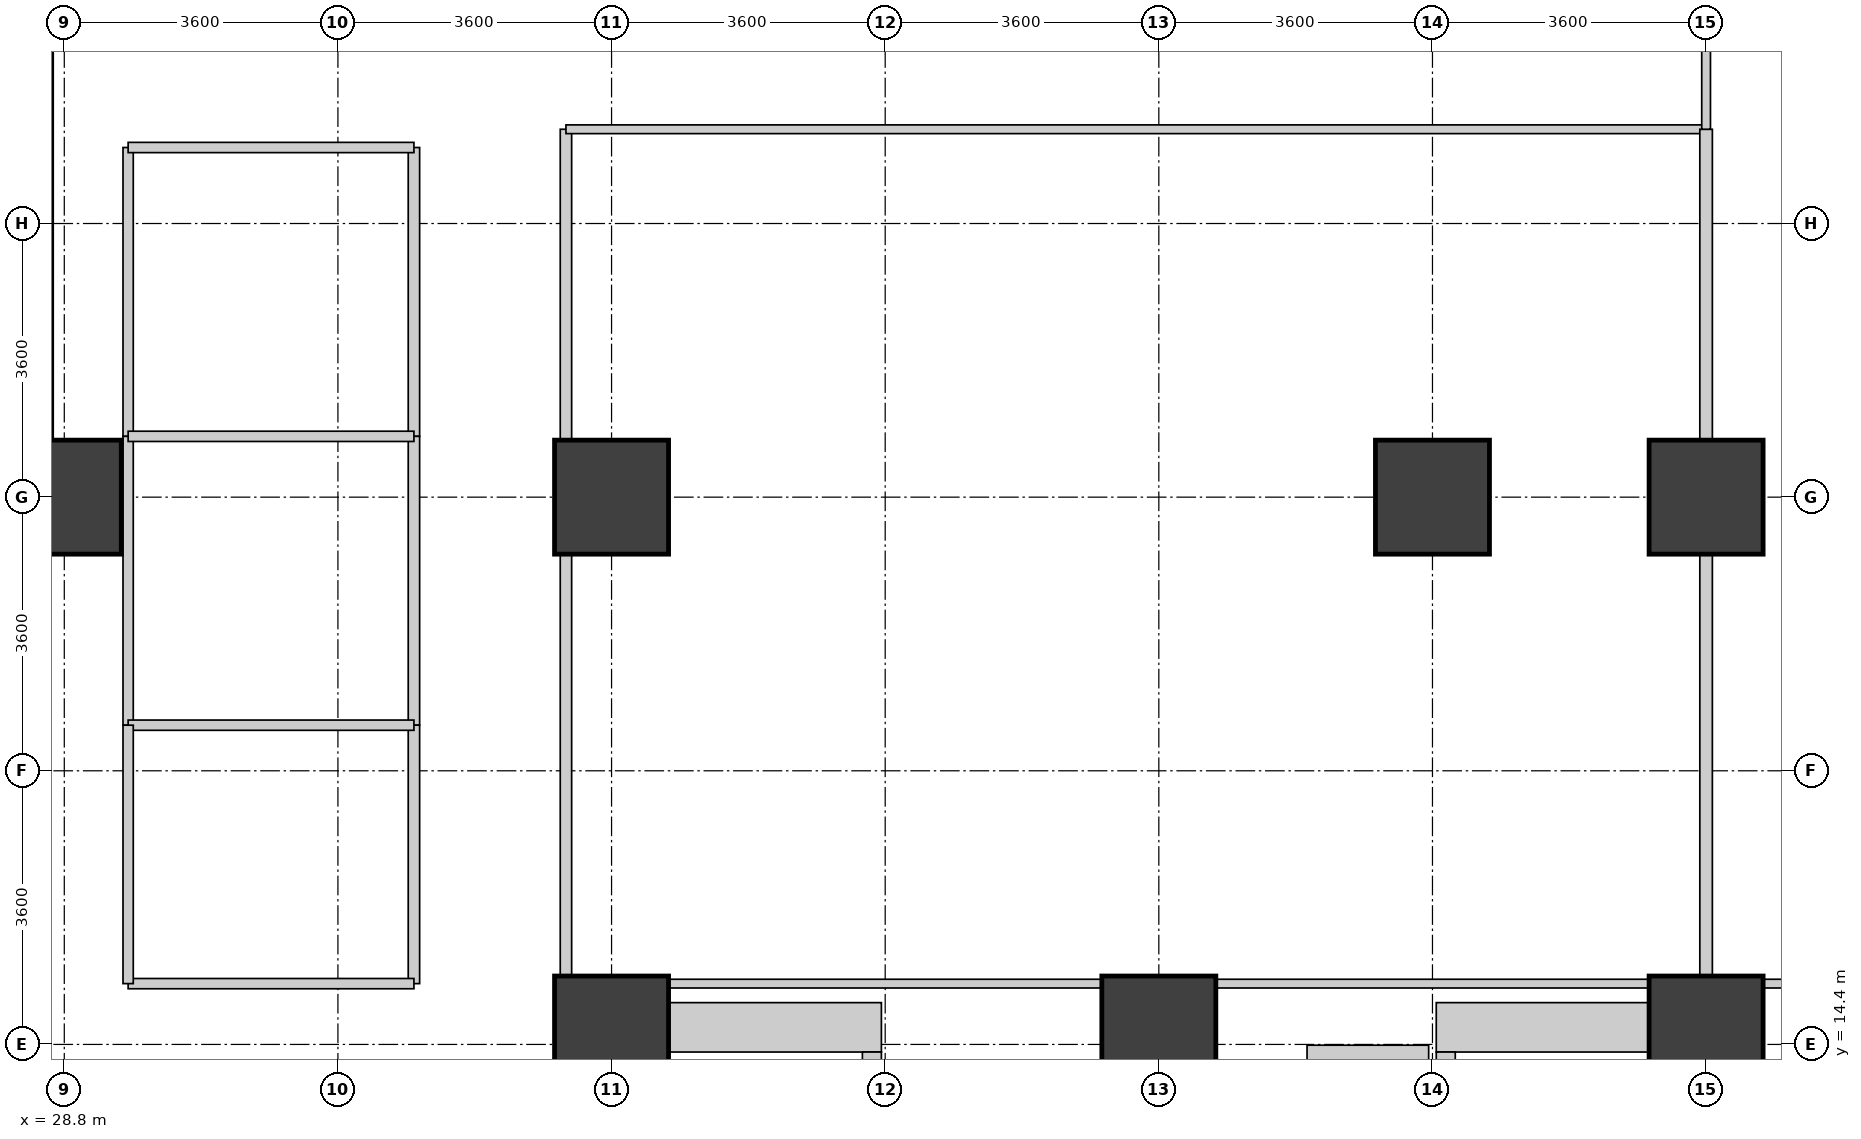
"""IFC4 building model, lengths in metres.
Left out: names, types, materials, properties, quantities, classifications, styles, units other than length and angle.
Written with IfcOpenShell. Run it as: python <this file> out.ifc"""

import sys

from ifc_helpers import new_model, si_unit, direction, frame, frame_2d, origin, origin_2d, place, context, subcontext, project, spatial, rectangle, extrude, source, transform, mapped, element, fill, save


model = new_model("IFC4")
c1 = context("Model", 3, precision=1e-05, world=origin(), true_north=direction((0.0, 1.0)))
c2 = subcontext(c1, "Body", "Model", "MODEL_VIEW")
j1 = project(units=[si_unit("LENGTHUNIT", "METRE"), si_unit("PLANEANGLEUNIT", "RADIAN")], contexts=[c1])
p1 = place(None, origin())
s1 = spatial("IfcSite", under=j1, at=p1, CompositionType="ELEMENT")
p2 = place(p1, origin())
s2 = spatial("IfcBuilding", under=s1, at=p2, CompositionType="ELEMENT")
p3 = place(p2, origin())
s3 = spatial("IfcBuildingStorey", under=s2, at=p3, CompositionType="ELEMENT", Elevation=0.0)
for number, where, z_axis, x_axis in (
    (1, (36.025, 6.65, 0.0), (0.0, 0.0, 1.0), (0.0, 1.0, 0.0)),
    (2, (50.375, 6.65, 0.0), (0.0, 0.0, 1.0), (0.0, 1.0, 0.0)),
):
    element("IfcWall", number, at=place(p3, frame(where, z_axis=z_axis, x_axis=x_axis)), inside=s3, PredefinedType="SHEAR", context=c2, shape_type="SweptSolid", body=[
        extrude(rectangle(XDim=8.3, YDim=0.65, at=frame_2d((4.15, 0.0))), origin(), (0.0, 0.0, 1.0), 5.12),
    ])
for number, where, z_axis, x_axis in (
    (3, (36.35, 14.625, 0.0), (0.0, 0.0, 1.0), (1.0, 0.0, 0.0)),
    (4, (46.85, 14.625, 0.0), (0.0, 0.0, 1.0), (1.0, 0.0, 0.0)),
):
    element("IfcWall", number, at=place(p3, frame(where, z_axis=z_axis, x_axis=x_axis)), inside=s3, PredefinedType="SHEAR", context=c2, shape_type="SweptSolid", body=[
        extrude(rectangle(XDim=3.2, YDim=0.65, at=frame_2d((1.6, 0.0))), origin(), (0.0, 0.0, 1.0), 5.12),
    ])
p4 = place(p3, frame((39.425, 7.3, 0.0), z_axis=(0.0, 0.0, 1.0), x_axis=(0.0, 1.0, 0.0)))
e5 = element("IfcWall", 5, at=p4, inside=s3, PredefinedType="SHEAR", context=c2, shape_type="SweptSolid", body=[
    extrude(rectangle(XDim=7.0, YDim=0.25, at=frame_2d((3.5, 0.0))), origin(), (0.0, 0.0, 1.0), 5.12),
])
p5 = place(p4, frame((0.15, 0.0, 0.0)))
e6 = element("IfcOpeningElement", 6, at=p5, cuts=e5, PredefinedType="OPENING", context=c2, shape_type="SweptSolid", body=[
    extrude(rectangle(XDim=1.1, YDim=2.08, at=frame_2d((0.55, 1.04))), frame((0.0, 0.135, 0.0), z_axis=(0.0, -1.0, 0.0), x_axis=(1.0, 0.0, 0.0)), (0.0, 0.0, 1.0), 0.27),
])
p6 = place(p3, frame((46.975, 7.3, 0.0), z_axis=(0.0, 0.0, 1.0), x_axis=(0.0, 1.0, 0.0)))
e7 = element("IfcWall", 7, at=p6, inside=s3, PredefinedType="SHEAR", context=c2, shape_type="SweptSolid", body=[
    extrude(rectangle(XDim=7.0, YDim=0.25, at=frame_2d((3.5, 0.0))), origin(), (0.0, 0.0, 1.0), 5.12),
])
p7 = place(p6, frame((0.15, 0.0, 0.0)))
e8 = element("IfcOpeningElement", 8, at=p7, cuts=e7, PredefinedType="OPENING", context=c2, shape_type="SweptSolid", body=[
    extrude(rectangle(XDim=1.1, YDim=2.08, at=frame_2d((0.55, 1.04))), frame((0.0, 0.135, 0.0), z_axis=(0.0, -1.0, 0.0), x_axis=(1.0, 0.0, 0.0)), (0.0, 0.0, 1.0), 0.27),
])
m1 = source(origin(), c2, "Body", "SweptSolid", [
    extrude(rectangle(XDim=1.5, YDim=1.5, at=origin_2d()), origin(), (0.0, 0.0, 1.0), 5.4),
])
for number, where, z_axis, x_axis in (
    (9, (28.8, 21.6, 0.0), (0.0, 0.0, 1.0), (1.0, 0.0, 0.0)),
    (10, (36.0, 21.6, 0.0), (0.0, 0.0, 1.0), (1.0, 0.0, 0.0)),
    (11, (46.8, 21.6, 0.0), (0.0, 0.0, 1.0), (1.0, 0.0, 0.0)),
    (12, (36.0, 14.55, 0.0), (0.0, 0.0, 1.0), (1.0, 0.0, 0.0)),
    (13, (43.2, 14.55, 0.0), (0.0, 0.0, 1.0), (1.0, 0.0, 0.0)),
    (14, (50.4, 14.55, 0.0), (0.0, 0.0, 1.0), (1.0, 0.0, 0.0)),
    (15, (50.4, 21.6, 0.0), (0.0, 0.0, 1.0), (1.0, 0.0, 0.0)),
):
    element("IfcColumn", number, at=place(p3, frame(where, z_axis=z_axis, x_axis=x_axis)), inside=s3, PredefinedType="COLUMN", context=c2, shape_type="MappedRepresentation", body=[
        mapped(m1, transform((0.0, 0.0, 0.0), x_axis=(1.0, 0.0, 0.0), y_axis=(0.0, 1.0, 0.0), z_axis=(0.0, 0.0, 1.0), scale=1.0)),
    ])
p8 = place(p3, frame((45.15, 14.29, 0.0), z_axis=(0.0, 0.0, 1.0), x_axis=(1.0, 0.0, 0.0)))
e16 = element("IfcWall", 16, at=p8, inside=s3, PredefinedType="PARTITIONING", context=c2, shape_type="SweptSolid", body=[
    extrude(rectangle(XDim=1.6, YDim=0.2, at=frame_2d((0.8, 0.0))), origin(), (0.0, 0.0, 1.0), 3.9),
])
p9 = place(p3, frame((35.4, 15.3, 0.0), z_axis=(0.0, 0.0, 1.0), x_axis=(0.0, 1.0, 0.0)))
e17 = element("IfcWall", 17, at=p9, inside=s3, PredefinedType="PARTITIONING", context=c2, shape_type="SweptSolid", body=[
    extrude(rectangle(XDim=5.55, YDim=0.15, at=frame_2d((2.775, 0.0))), origin(), (0.0, 0.0, 1.0), 5.1),
])
p10 = place(p9, frame((2.125, 0.0, 0.0)))
e18 = element("IfcOpeningElement", 18, at=p10, cuts=e17, PredefinedType="OPENING", context=c2, shape_type="SweptSolid", body=[
    extrude(rectangle(XDim=1.3, YDim=2.12, at=frame_2d((0.65, 1.06))), frame((0.0, 0.085, 0.0), z_axis=(0.0, -1.0, 0.0), x_axis=(1.0, 0.0, 0.0)), (0.0, 0.0, 1.0), 0.17),
])
p11 = place(p3, frame((35.4, 22.35, 0.0), z_axis=(0.0, 0.0, 1.0), x_axis=(0.0, 1.0, 0.0)))
e19 = element("IfcWall", 19, at=p11, inside=s3, PredefinedType="PARTITIONING", context=c2, shape_type="SweptSolid", body=[
    extrude(rectangle(XDim=4.09, YDim=0.15, at=frame_2d((2.045, 0.0))), origin(), (0.0, 0.0, 1.0), 5.1),
])
p12 = place(p3, frame((33.4, 22.4, 0.0), z_axis=(0.0, 0.0, 1.0), x_axis=(0.0, 1.0, 0.0)))
e20 = element("IfcWall", 20, at=p12, inside=s3, PredefinedType="PARTITIONING", context=c2, shape_type="SweptSolid", body=[
    extrude(rectangle(XDim=3.8, YDim=0.15, at=frame_2d((1.9, 0.0))), origin(), (0.0, 0.0, 1.0), 5.1),
])
p13 = place(p12, frame((1.475, 0.0, 0.0)))
e21 = element("IfcOpeningElement", 21, at=p13, cuts=e20, PredefinedType="OPENING", context=c2, shape_type="SweptSolid", body=[
    extrude(rectangle(XDim=0.85, YDim=2.04, at=frame_2d((0.425, 1.02))), frame((0.0, 0.085, 0.0), z_axis=(0.0, -1.0, 0.0), x_axis=(1.0, 0.0, 0.0)), (0.0, 0.0, 1.0), 0.17),
])
p14 = place(p3, frame((33.4, 18.6, 0.0), z_axis=(0.0, 0.0, 1.0), x_axis=(0.0, 1.0, 0.0)))
e22 = element("IfcWall", 22, at=p14, inside=s3, PredefinedType="PARTITIONING", context=c2, shape_type="SweptSolid", body=[
    extrude(rectangle(XDim=3.8, YDim=0.15, at=frame_2d((1.9, 0.0))), origin(), (0.0, 0.0, 1.0), 5.1),
])
p15 = place(p14, frame((1.475, 0.0, 0.0)))
e23 = element("IfcOpeningElement", 23, at=p15, cuts=e22, PredefinedType="OPENING", context=c2, shape_type="SweptSolid", body=[
    extrude(rectangle(XDim=0.85, YDim=2.04, at=frame_2d((0.425, 1.02))), frame((0.0, 0.085, 0.0), z_axis=(0.0, -1.0, 0.0), x_axis=(1.0, 0.0, 0.0)), (0.0, 0.0, 1.0), 0.17),
])
p16 = place(p3, frame((33.4, 15.2, 0.0), z_axis=(0.0, 0.0, 1.0), x_axis=(0.0, 1.0, 0.0)))
e24 = element("IfcWall", 24, at=p16, inside=s3, PredefinedType="PARTITIONING", context=c2, shape_type="SweptSolid", body=[
    extrude(rectangle(XDim=3.4, YDim=0.15, at=frame_2d((1.7, 0.0))), origin(), (0.0, 0.0, 1.0), 5.1),
])
p17 = place(p16, frame((1.175, 0.0, 0.0)))
e25 = element("IfcOpeningElement", 25, at=p17, cuts=e24, PredefinedType="OPENING", context=c2, shape_type="SweptSolid", body=[
    extrude(rectangle(XDim=1.05, YDim=2.12, at=frame_2d((0.525, 1.06))), frame((0.0, 0.085, 0.0), z_axis=(0.0, -1.0, 0.0), x_axis=(1.0, 0.0, 0.0)), (0.0, 0.0, 1.0), 0.17),
])
p18 = place(p3, frame((51.15, 15.2, 0.0), z_axis=(0.0, 0.0, 1.0), x_axis=(1.0, 0.0, 0.0)))
e26 = element("IfcWall", 26, at=p18, inside=s3, PredefinedType="PARTITIONING", context=c2, shape_type="SweptSolid", body=[
    extrude(rectangle(XDim=2.5, YDim=0.115, at=frame_2d((1.25, 0.0))), origin(), (0.0, 0.0, 1.0), 5.1),
])
for number, where, z_axis, x_axis in (
    (27, (36.75, 15.2, 0.0), (0.0, 0.0, 1.0), (1.0, 0.0, 0.0)),
    (28, (43.95, 15.2, 0.0), (0.0, 0.0, 1.0), (1.0, 0.0, 0.0)),
):
    element("IfcWall", number, at=place(p3, frame(where, z_axis=z_axis, x_axis=x_axis)), inside=s3, PredefinedType="PARTITIONING", context=c2, shape_type="SweptSolid", body=[
        extrude(rectangle(XDim=5.7, YDim=0.115, at=frame_2d((2.85, 0.0))), origin(), (0.0, 0.0, 1.0), 5.1),
    ])
p19 = place(p3, frame((35.4, 26.44, 0.0), z_axis=(0.0, 0.0, 1.0), x_axis=(1.0, 0.0, 0.0)))
e29 = element("IfcWall", 29, at=p19, inside=s3, PredefinedType="PARTITIONING", context=c2, shape_type="SweptSolid", body=[
    extrude(rectangle(XDim=15.0, YDim=0.115, at=frame_2d((7.5, 0.0))), origin(), (0.0, 0.0, 1.0), 5.1),
])
p20 = place(p3, frame((50.4, 15.2, 0.0), z_axis=(0.0, 0.0, 1.0), x_axis=(0.0, 1.0, 0.0)))
e30 = element("IfcWall", 30, at=p20, inside=s3, PredefinedType="PARTITIONING", context=c2, shape_type="SweptSolid", body=[
    extrude(rectangle(XDim=11.24, YDim=0.165, at=frame_2d((5.62, 0.0))), origin(), (0.0, 0.0, 1.0), 4.5),
])
p21 = place(p3, frame((50.4, 26.44, 0.0), z_axis=(0.0, 0.0, 1.0), x_axis=(0.0, 1.0, 0.0)))
e31 = element("IfcWall", 31, at=p21, inside=s3, PredefinedType="PARTITIONING", context=c2, shape_type="SweptSolid", body=[
    extrude(rectangle(XDim=1.46, YDim=0.115, at=frame_2d((0.73, 0.0))), origin(), (0.0, 0.0, 1.0), 5.1),
])
p22 = place(p3, frame((29.64, 22.4, 0.0), z_axis=(0.0, 0.0, 1.0), x_axis=(0.0, 1.0, 0.0)))
e32 = element("IfcWall", 32, at=p22, inside=s3, PredefinedType="PARTITIONING", context=c2, shape_type="SweptSolid", body=[
    extrude(rectangle(XDim=3.8, YDim=0.135, at=frame_2d((1.9, 0.0))), origin(), (0.0, 0.0, 1.0), 5.1),
])
p23 = place(p3, frame((29.64, 18.6, 0.0), z_axis=(0.0, 0.0, 1.0), x_axis=(0.0, 1.0, 0.0)))
e33 = element("IfcWall", 33, at=p23, inside=s3, PredefinedType="PARTITIONING", context=c2, shape_type="SweptSolid", body=[
    extrude(rectangle(XDim=3.8, YDim=0.135, at=frame_2d((1.9, 0.0))), origin(), (0.0, 0.0, 1.0), 5.1),
])
for number, where, z_axis, x_axis in (
    (34, (29.64, 15.2, 0.0), (0.0, 0.0, 1.0), (1.0, 0.0, 0.0)),
    (35, (29.64, 18.6, 0.0), (0.0, 0.0, 1.0), (1.0, 0.0, 0.0)),
    (36, (29.64, 22.4, 0.0), (0.0, 0.0, 1.0), (1.0, 0.0, 0.0)),
    (37, (29.64, 26.2, 0.0), (0.0, 0.0, 1.0), (1.0, 0.0, 0.0)),
):
    element("IfcWall", number, at=place(p3, frame(where, z_axis=z_axis, x_axis=x_axis)), inside=s3, PredefinedType="PARTITIONING", context=c2, shape_type="SweptSolid", body=[
        extrude(rectangle(XDim=3.76, YDim=0.135, at=frame_2d((1.88, 0.0))), origin(), (0.0, 0.0, 1.0), 5.1),
    ])
p24 = place(p3, frame((29.64, 15.2, 0.0), z_axis=(0.0, 0.0, 1.0), x_axis=(0.0, 1.0, 0.0)))
e38 = element("IfcWall", 38, at=p24, inside=s3, PredefinedType="PARTITIONING", context=c2, shape_type="SweptSolid", body=[
    extrude(rectangle(XDim=3.4, YDim=0.135, at=frame_2d((1.7, 0.0))), origin(), (0.0, 0.0, 1.0), 5.1),
])
p25 = place(p10, origin())
e39 = element("IfcDoor", 39, at=p25, inside=s3, OperationType="DOUBLE_DOOR_SINGLE_SWING", PredefinedType="DOOR", context=c2, shape_type="SweptSolid", body=[
    extrude(rectangle(XDim=1.3, YDim=2.12, at=frame_2d((0.65, 1.06))), frame((0.0, 0.025, 0.0), z_axis=(0.0, -1.0, 0.0), x_axis=(1.0, 0.0, 0.0)), (0.0, 0.0, 1.0), 0.05),
])
fill(e18, e39)
p26 = place(p13, origin())
e40 = element("IfcDoor", 40, at=p26, inside=s3, OperationType="SINGLE_SWING_LEFT", PredefinedType="DOOR", context=c2, shape_type="SweptSolid", body=[
    extrude(rectangle(XDim=0.85, YDim=2.04, at=frame_2d((0.425, 1.02))), frame((0.0, 0.025, 0.0), z_axis=(0.0, -1.0, 0.0), x_axis=(1.0, 0.0, 0.0)), (0.0, 0.0, 1.0), 0.05),
])
fill(e21, e40)
p27 = place(p15, origin())
e41 = element("IfcDoor", 41, at=p27, inside=s3, OperationType="SINGLE_SWING_RIGHT", PredefinedType="DOOR", context=c2, shape_type="SweptSolid", body=[
    extrude(rectangle(XDim=0.85, YDim=2.04, at=frame_2d((0.425, 1.02))), frame((0.0, 0.025, 0.0), z_axis=(0.0, -1.0, 0.0), x_axis=(1.0, 0.0, 0.0)), (0.0, 0.0, 1.0), 0.05),
])
fill(e23, e41)
p28 = place(p17, origin())
e42 = element("IfcDoor", 42, at=p28, inside=s3, OperationType="SINGLE_SWING_LEFT", PredefinedType="DOOR", context=c2, shape_type="SweptSolid", body=[
    extrude(rectangle(XDim=1.05, YDim=2.12, at=frame_2d((0.525, 1.06))), frame((0.0, 0.025, 0.0), z_axis=(0.0, -1.0, 0.0), x_axis=(1.0, 0.0, 0.0)), (0.0, 0.0, 1.0), 0.05),
])
fill(e25, e42)
save(model, sys.argv[1])
